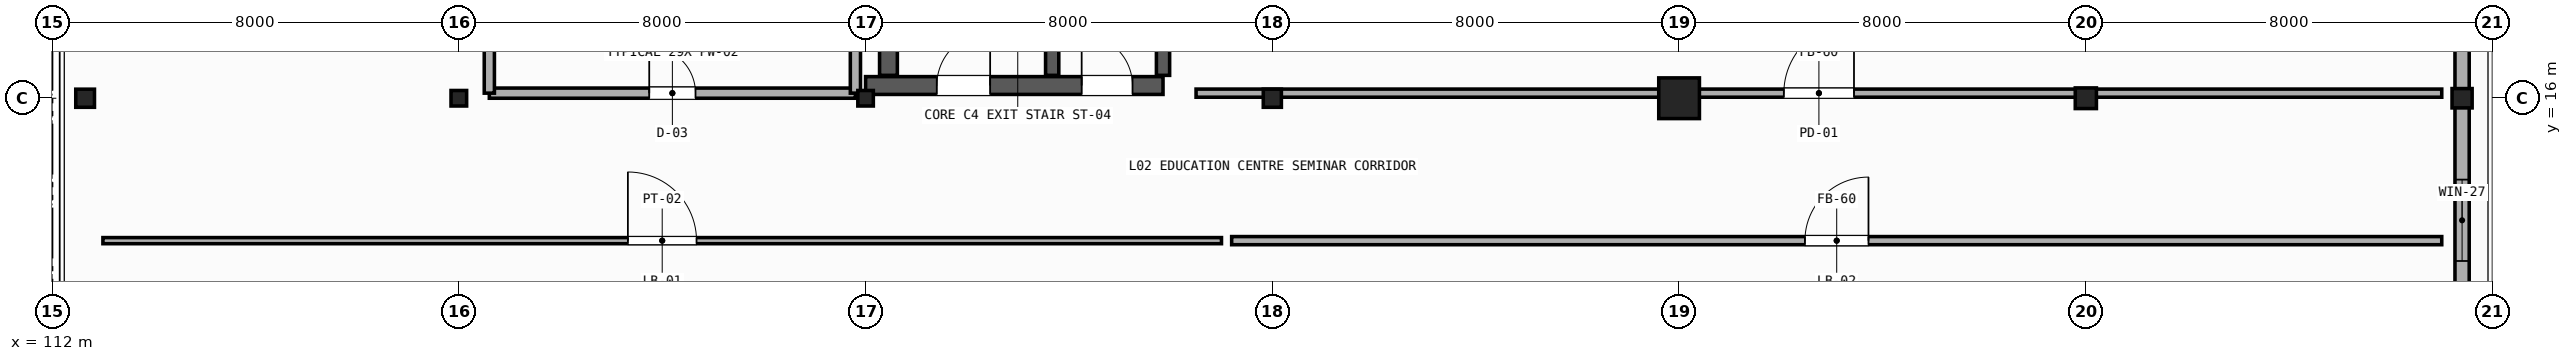
"""IFC4 building model, lengths in metres.
Left out: names, types, materials, properties, quantities, classifications, styles, units other than length and angle.
Written with IfcOpenShell. Run it as: python <this file> out.ifc"""

import sys

from ifc_helpers import new_model, si_unit, direction, frame, frame_2d, origin, origin_2d, place, context, subcontext, project, spatial, rectangle, hollow_rectangle, hollow_circle, i_section, extrude, element, fill, save


model = new_model("IFC4")
c1 = context("Model", 3, precision=1e-05, world=origin(), true_north=direction((0.0, 1.0)))
c2 = subcontext(c1, "Body", "Model", "MODEL_VIEW")
j1 = project(units=[si_unit("LENGTHUNIT", "METRE"), si_unit("PLANEANGLEUNIT", "RADIAN")], contexts=[c1])
p1 = place(None, origin())
s1 = spatial("IfcSite", under=j1, at=p1, CompositionType="ELEMENT")
p2 = place(p1, origin())
s2 = spatial("IfcBuilding", under=s1, at=p2, CompositionType="ELEMENT")
p3 = place(p2, frame((0.0, 0.0, 10.2)))
s3 = spatial("IfcBuildingStorey", under=s2, at=p3, CompositionType="ELEMENT", Elevation=10.2)
p4 = place(p3, frame((112.65, 16.0, 0.0), z_axis=(0.0, 0.0, 1.0), x_axis=(1.0, 0.0, 0.0)))
e1 = element("IfcColumn", 1, at=p4, inside=s3, PredefinedType="COLUMN", context=c2, shape_type="SweptSolid", body=[
    extrude(i_section(OverallWidth=0.368, OverallDepth=0.356, WebThickness=0.011, FlangeThickness=0.018, FilletRadius=0.015, at=origin_2d()), origin(), (0.0, 0.0, 1.0), 4.8),
])
p5 = place(p3, frame((120.0, 16.0, 0.0), z_axis=(0.0, 0.0, 1.0), x_axis=(0.0, 1.0, 0.0)))
e2 = element("IfcColumn", 2, at=p5, inside=s3, PredefinedType="COLUMN", context=c2, shape_type="SweptSolid", body=[
    extrude(i_section(OverallWidth=0.305, OverallDepth=0.307, WebThickness=0.01, FlangeThickness=0.015, FilletRadius=0.013, at=origin_2d()), origin(), (0.0, 0.0, 1.0), 4.58),
])
p6 = place(p3, frame((128.0, 16.0, 0.0), z_axis=(0.0, 0.0, 1.0), x_axis=(1.0, 0.0, 0.0)))
e3 = element("IfcColumn", 3, at=p6, inside=s3, PredefinedType="COLUMN", context=c2, shape_type="SweptSolid", body=[
    extrude(hollow_rectangle(XDim=0.305, YDim=0.305, WallThickness=0.012, InnerFilletRadius=0.012, OuterFilletRadius=0.024, at=origin_2d()), origin(), (0.0, 0.0, 1.0), 4.58),
])
p7 = place(p3, frame((136.0, 16.0, 0.0), z_axis=(0.0, 0.0, 1.0), x_axis=(0.0, 1.0, 0.0)))
e4 = element("IfcColumn", 4, at=p7, inside=s3, PredefinedType="COLUMN", context=c2, shape_type="SweptSolid", body=[
    extrude(hollow_circle(Radius=0.178, WallThickness=0.012, at=origin_2d()), origin(), (0.0, 0.0, 1.0), 4.58),
])
p8 = place(p3, frame((144.0, 16.0, 0.0), z_axis=(0.0, 0.0, 1.0), x_axis=(1.0, 0.0, 0.0)))
e5 = element("IfcColumn", 5, at=p8, inside=s3, PredefinedType="COLUMN", context=c2, shape_type="SweptSolid", body=[
    extrude(rectangle(XDim=0.8, YDim=0.8, at=origin_2d()), origin(), (0.0, 0.0, 1.0), 4.58),
])
p9 = place(p3, frame((152.0, 16.0, 0.0), z_axis=(0.0, 0.0, 1.0), x_axis=(0.0, 1.0, 0.0)))
e6 = element("IfcColumn", 6, at=p9, inside=s3, PredefinedType="COLUMN", context=c2, shape_type="SweptSolid", body=[
    extrude(i_section(OverallWidth=0.406, OverallDepth=0.416, WebThickness=0.03, FlangeThickness=0.048, FilletRadius=0.015, at=origin_2d()), origin(), (0.0, 0.0, 1.0), 4.58),
])
p10 = place(p3, frame((159.4, 16.0, 0.0), z_axis=(0.0, 0.0, 1.0), x_axis=(1.0, 0.0, 0.0)))
e7 = element("IfcColumn", 7, at=p10, inside=s3, PredefinedType="COLUMN", context=c2, shape_type="SweptSolid", body=[
    extrude(i_section(OverallWidth=0.395, OverallDepth=0.38, WebThickness=0.019, FlangeThickness=0.03, FilletRadius=0.015, at=origin_2d()), origin(), (0.0, 0.0, 1.0), 4.58),
])
p11 = place(p3, frame((159.4, 8.0, 0.0), z_axis=(0.0, 0.0, 1.0), x_axis=(0.0, 1.0, 0.0)))
e8 = element("IfcWall", 8, at=p11, inside=s3, PredefinedType="STANDARD", context=c2, shape_type="SweptSolid", body=[
    extrude(rectangle(XDim=8.0, YDim=0.28, at=frame_2d((4.0, 0.0))), origin(), (0.0, 0.0, 1.0), 3.74),
])
p12 = place(p11, frame((1.6, 0.0, 1.05)))
e9 = element("IfcOpeningElement", 9, at=p12, cuts=e8, PredefinedType="OPENING", context=c2, shape_type="SweptSolid", body=[
    extrude(rectangle(XDim=1.6, YDim=1.75, at=frame_2d((0.8, 0.875))), frame((0.0, 0.15, 0.0), z_axis=(0.0, -1.0, 0.0), x_axis=(1.0, 0.0, 0.0)), (0.0, 0.0, 1.0), 0.3),
])
p13 = place(p11, frame((4.8, 0.0, 1.05)))
e10 = element("IfcOpeningElement", 10, at=p13, cuts=e8, PredefinedType="OPENING", context=c2, shape_type="SweptSolid", body=[
    extrude(rectangle(XDim=1.6, YDim=1.75, at=frame_2d((0.8, 0.875))), frame((0.0, 0.15, 0.0), z_axis=(0.0, -1.0, 0.0), x_axis=(1.0, 0.0, 0.0)), (0.0, 0.0, 1.0), 0.3),
])
p14 = place(p3, frame((159.4, 16.0, 0.0), z_axis=(0.0, 0.0, 1.0), x_axis=(0.0, 1.0, 0.0)))
e11 = element("IfcWall", 11, at=p14, inside=s3, PredefinedType="STANDARD", context=c2, shape_type="SweptSolid", body=[
    extrude(rectangle(XDim=8.0, YDim=0.28, at=frame_2d((4.0, 0.0))), origin(), (0.0, 0.0, 1.0), 3.74),
])
p15 = place(p3, frame((128.0, 16.25, 0.0), z_axis=(0.0, 0.0, 1.0), x_axis=(1.0, 0.0, 0.0)))
e12 = element("IfcWall", 12, at=p15, inside=s3, PredefinedType="SHEAR", context=c2, shape_type="SweptSolid", body=[
    extrude(rectangle(XDim=5.85, YDim=0.35, at=frame_2d((2.925, 0.0))), origin(), (0.0, 0.0, 1.0), 4.57),
])
p16 = place(p15, frame((1.4, 0.0, 0.0)))
e13 = element("IfcOpeningElement", 13, at=p16, cuts=e12, PredefinedType="OPENING", context=c2, shape_type="SweptSolid", body=[
    extrude(rectangle(XDim=1.05, YDim=2.1, at=frame_2d((0.525, 1.05))), frame((0.0, 0.185, 0.0), z_axis=(0.0, -1.0, 0.0), x_axis=(1.0, 0.0, 0.0)), (0.0, 0.0, 1.0), 0.37),
])
p17 = place(p15, frame((4.25, 0.0, 0.0)))
e14 = element("IfcOpeningElement", 14, at=p17, cuts=e12, PredefinedType="OPENING", context=c2, shape_type="SweptSolid", body=[
    extrude(rectangle(XDim=1.0, YDim=2.15, at=frame_2d((0.5, 1.075))), frame((0.0, 0.185, 0.0), z_axis=(0.0, -1.0, 0.0), x_axis=(1.0, 0.0, 0.0)), (0.0, 0.0, 1.0), 0.37),
])
p18 = place(p3, frame((128.45, 16.45, 0.0), z_axis=(0.0, 0.0, 1.0), x_axis=(0.0, 1.0, 0.0)))
e15 = element("IfcWall", 15, at=p18, inside=s3, PredefinedType="SHEAR", context=c2, shape_type="SweptSolid", body=[
    extrude(rectangle(XDim=6.95, YDim=0.35, at=frame_2d((3.475, 0.0))), origin(), (0.0, 0.0, 1.0), 4.57),
])
for number, where, z_axis, x_axis in (
    (16, (133.85, 16.45, 0.0), (0.0, 0.0, 1.0), (0.0, 1.0, 0.0)),
    (17, (131.67, 16.45, 0.0), (0.0, 0.0, 1.0), (0.0, 1.0, 0.0)),
):
    element("IfcWall", number, at=place(p3, frame(where, z_axis=z_axis, x_axis=x_axis)), inside=s3, PredefinedType="SHEAR", context=c2, shape_type="SweptSolid", body=[
        extrude(rectangle(XDim=6.95, YDim=0.26, at=frame_2d((3.475, 0.0))), origin(), (0.0, 0.0, 1.0), 4.57),
    ])
p19 = place(p3, frame((113.0, 13.2, 0.0), z_axis=(0.0, 0.0, 1.0), x_axis=(1.0, 0.0, 0.0)))
e18 = element("IfcWall", 18, at=p19, inside=s3, PredefinedType="PARTITIONING", context=c2, shape_type="SweptSolid", body=[
    extrude(rectangle(XDim=22.0, YDim=0.12, at=frame_2d((11.0, 0.0))), origin(), (0.0, 0.0, 1.0), 3.778),
])
p20 = place(p19, frame((10.325, 0.0, 0.0)))
e19 = element("IfcOpeningElement", 19, at=p20, cuts=e18, PredefinedType="OPENING", context=c2, shape_type="SweptSolid", body=[
    extrude(rectangle(XDim=1.35, YDim=2.25, at=frame_2d((0.675, 1.125))), frame((0.0, 0.07, 0.0), z_axis=(0.0, -1.0, 0.0), x_axis=(1.0, 0.0, 0.0)), (0.0, 0.0, 1.0), 0.14),
])
p21 = place(p3, frame((135.2, 13.2, 0.0), z_axis=(0.0, 0.0, 1.0), x_axis=(1.0, 0.0, 0.0)))
e20 = element("IfcWall", 20, at=p21, inside=s3, PredefinedType="PARTITIONING", context=c2, shape_type="SweptSolid", body=[
    extrude(rectangle(XDim=23.8, YDim=0.16, at=frame_2d((11.9, 0.0))), origin(), (0.0, 0.0, 1.0), 3.787),
])
p22 = place(p21, frame((11.275, 0.0, 0.0)))
e21 = element("IfcOpeningElement", 21, at=p22, cuts=e20, PredefinedType="OPENING", context=c2, shape_type="SweptSolid", body=[
    extrude(rectangle(XDim=1.25, YDim=2.2, at=frame_2d((0.625, 1.1))), frame((0.0, 0.09, 0.0), z_axis=(0.0, -1.0, 0.0), x_axis=(1.0, 0.0, 0.0)), (0.0, 0.0, 1.0), 0.18),
])
p23 = place(p3, frame((120.6, 16.1, 0.0), z_axis=(0.0, 0.0, 1.0), x_axis=(1.0, 0.0, 0.0)))
e22 = element("IfcWall", 22, at=p23, inside=s3, PredefinedType="PLUMBINGWALL", context=c2, shape_type="SweptSolid", body=[
    extrude(rectangle(XDim=7.2, YDim=0.2, at=frame_2d((3.6, 0.0))), origin(), (0.0, 0.0, 1.0), 3.938),
])
p24 = place(p23, frame((3.145, 0.0, 0.0)))
e23 = element("IfcOpeningElement", 23, at=p24, cuts=e22, PredefinedType="OPENING", context=c2, shape_type="SweptSolid", body=[
    extrude(rectangle(XDim=0.91, YDim=2.1, at=frame_2d((0.455, 1.05))), frame((0.0, 0.11, 0.0), z_axis=(0.0, -1.0, 0.0), x_axis=(1.0, 0.0, 0.0)), (0.0, 0.0, 1.0), 0.22),
])
p25 = place(p3, frame((120.6, 16.1, 0.0), z_axis=(0.0, 0.0, 1.0), x_axis=(0.0, 1.0, 0.0)))
e24 = element("IfcWall", 24, at=p25, inside=s3, PredefinedType="PLUMBINGWALL", context=c2, shape_type="SweptSolid", body=[
    extrude(rectangle(XDim=10.3, YDim=0.2, at=frame_2d((5.15, 0.0))), origin(), (0.0, 0.0, 1.0), 4.007),
])
p26 = place(p3, frame((127.8, 16.1, 0.0), z_axis=(0.0, 0.0, 1.0), x_axis=(0.0, 1.0, 0.0)))
e25 = element("IfcWall", 25, at=p26, inside=s3, PredefinedType="PLUMBINGWALL", context=c2, shape_type="SweptSolid", body=[
    extrude(rectangle(XDim=10.3, YDim=0.2, at=frame_2d((5.15, 0.0))), origin(), (0.0, 0.0, 1.0), 3.778),
])
p27 = place(p3, frame((134.5, 16.1, 0.0), z_axis=(0.0, 0.0, 1.0), x_axis=(1.0, 0.0, 0.0)))
e26 = element("IfcWall", 26, at=p27, inside=s3, PredefinedType="PARTITIONING", context=c2, shape_type="SweptSolid", body=[
    extrude(rectangle(XDim=24.5, YDim=0.16, at=frame_2d((12.25, 0.0))), origin(), (0.0, 0.0, 1.0), 3.778),
])
p28 = place(p27, frame((11.56, 0.0, 0.0)))
e27 = element("IfcOpeningElement", 27, at=p28, cuts=e26, PredefinedType="OPENING", context=c2, shape_type="SweptSolid", body=[
    extrude(rectangle(XDim=1.38, YDim=2.25, at=frame_2d((0.69, 1.125))), frame((0.0, 0.09, 0.0), z_axis=(0.0, -1.0, 0.0), x_axis=(1.0, 0.0, 0.0)), (0.0, 0.0, 1.0), 0.18),
])
p29 = place(p13, origin())
e28 = element("IfcWindow", 28, at=p29, inside=s3, PartitioningType="SINGLE_PANEL", PredefinedType="WINDOW", context=c2, shape_type="SweptSolid", body=[
    extrude(rectangle(XDim=1.6, YDim=1.75, at=frame_2d((0.8, 0.875))), frame((0.0, 0.03, 0.0), z_axis=(0.0, -1.0, 0.0), x_axis=(1.0, 0.0, 0.0)), (0.0, 0.0, 1.0), 0.06),
])
fill(e10, e28)
p30 = place(p16, origin())
e29 = element("IfcDoor", 29, at=p30, inside=s3, OperationType="SINGLE_SWING_RIGHT", PredefinedType="DOOR", context=c2, shape_type="SweptSolid", body=[
    extrude(rectangle(XDim=1.05, YDim=2.1, at=frame_2d((0.525, 1.05))), frame((0.0, 0.025, 0.0), z_axis=(0.0, -1.0, 0.0), x_axis=(1.0, 0.0, 0.0)), (0.0, 0.0, 1.0), 0.05),
])
fill(e13, e29)
p31 = place(p17, origin())
e30 = element("IfcDoor", 30, at=p31, inside=s3, OperationType="SINGLE_SWING_LEFT", PredefinedType="DOOR", context=c2, shape_type="SweptSolid", body=[
    extrude(rectangle(XDim=1.0, YDim=2.15, at=frame_2d((0.5, 1.075))), frame((0.0, 0.025, 0.0), z_axis=(0.0, -1.0, 0.0), x_axis=(1.0, 0.0, 0.0)), (0.0, 0.0, 1.0), 0.05),
])
fill(e14, e30)
p32 = place(p20, origin())
e31 = element("IfcDoor", 31, at=p32, inside=s3, OperationType="SINGLE_SWING_LEFT", PredefinedType="DOOR", context=c2, shape_type="SweptSolid", body=[
    extrude(rectangle(XDim=1.35, YDim=2.25, at=frame_2d((0.675, 1.125))), frame((0.0, 0.025, 0.0), z_axis=(0.0, -1.0, 0.0), x_axis=(1.0, 0.0, 0.0)), (0.0, 0.0, 1.0), 0.05),
])
fill(e19, e31)
p33 = place(p22, origin())
e32 = element("IfcDoor", 32, at=p33, inside=s3, OperationType="SINGLE_SWING_RIGHT", PredefinedType="DOOR", context=c2, shape_type="SweptSolid", body=[
    extrude(rectangle(XDim=1.25, YDim=2.2, at=frame_2d((0.625, 1.1))), frame((0.0, 0.025, 0.0), z_axis=(0.0, -1.0, 0.0), x_axis=(1.0, 0.0, 0.0)), (0.0, 0.0, 1.0), 0.05),
])
fill(e21, e32)
p34 = place(p24, origin())
e33 = element("IfcDoor", 33, at=p34, inside=s3, OperationType="SINGLE_SWING_LEFT", PredefinedType="DOOR", context=c2, shape_type="SweptSolid", body=[
    extrude(rectangle(XDim=0.91, YDim=2.1, at=frame_2d((0.455, 1.05))), frame((0.0, 0.025, 0.0), z_axis=(0.0, -1.0, 0.0), x_axis=(1.0, 0.0, 0.0)), (0.0, 0.0, 1.0), 0.05),
])
fill(e23, e33)
p35 = place(p28, origin())
e34 = element("IfcDoor", 34, at=p35, inside=s3, OperationType="SINGLE_SWING_RIGHT", PredefinedType="DOOR", context=c2, shape_type="SweptSolid", body=[
    extrude(rectangle(XDim=1.38, YDim=2.25, at=frame_2d((0.69, 1.125))), frame((0.0, 0.025, 0.0), z_axis=(0.0, -1.0, 0.0), x_axis=(1.0, 0.0, 0.0)), (0.0, 0.0, 1.0), 0.05),
])
fill(e27, e34)
save(model, sys.argv[1])
